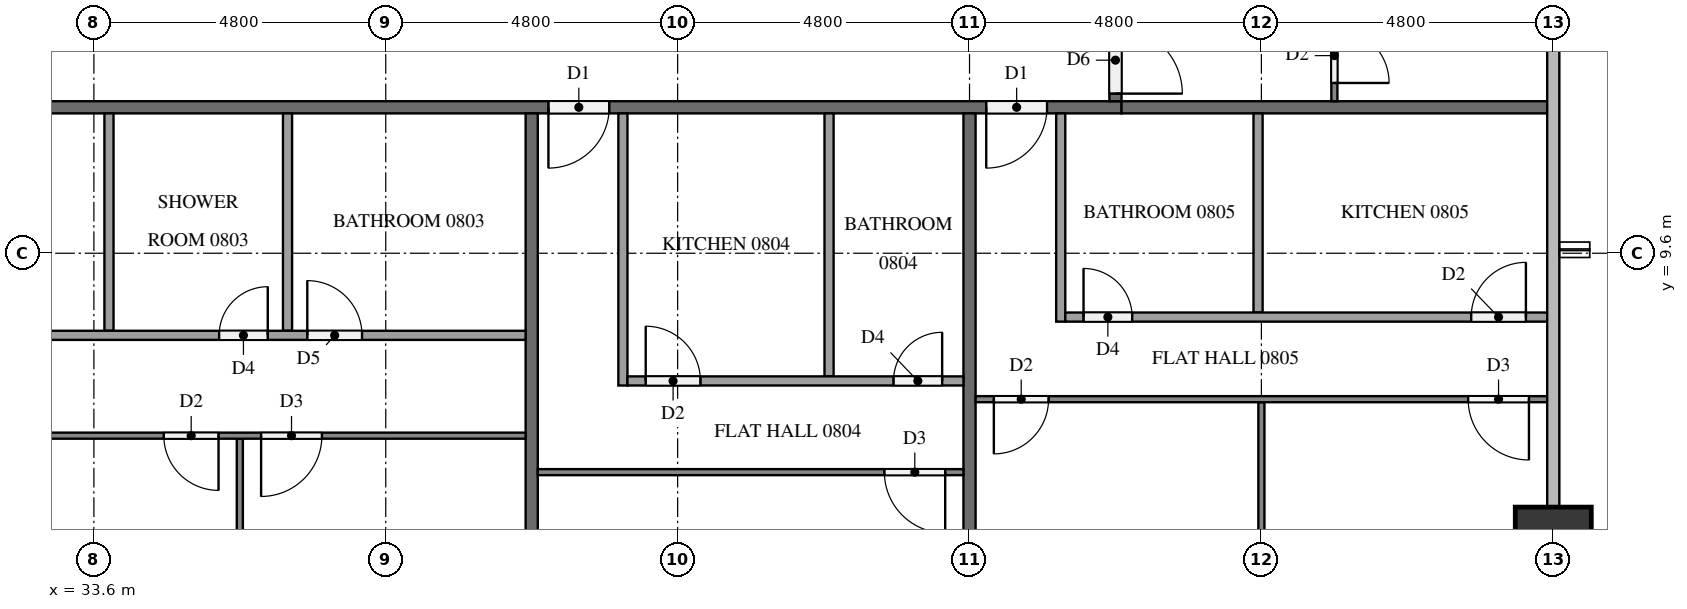
"""IFC4 building model, lengths in metres.
Left out: names, types, materials, properties, quantities, classifications, styles, units other than length and angle.
Written with IfcOpenShell. Run it as: python <this file> out.ifc"""

import sys

from ifc_helpers import new_model, si_unit, direction, frame, frame_2d, origin, origin_2d, place, context, subcontext, project, spatial, rectangle, extrude, element, fill, save


model = new_model("IFC4")
c1 = context("Model", 3, precision=1e-05, world=origin(), true_north=direction((0.0, 1.0)))
c2 = subcontext(c1, "Body", "Model", "MODEL_VIEW")
j1 = project(units=[si_unit("LENGTHUNIT", "METRE"), si_unit("PLANEANGLEUNIT", "RADIAN")], contexts=[c1])
p1 = place(None, origin())
s1 = spatial("IfcSite", under=j1, at=p1, CompositionType="ELEMENT")
p2 = place(p1, origin())
s2 = spatial("IfcBuilding", under=s1, at=p2, CompositionType="ELEMENT")
p3 = place(p2, frame((0.0, 0.0, 36.4)))
s3 = spatial("IfcBuildingStorey", under=s2, at=p3, CompositionType="ELEMENT", Elevation=36.4)
p4 = place(p3, frame((57.6, 4.8, 0.0), z_axis=(0.0, 0.0, 1.0), x_axis=(1.0, 0.0, 0.0)))
e1 = element("IfcColumn", 1, at=p4, inside=s3, PredefinedType="COLUMN", context=c2, shape_type="SweptSolid", body=[
    extrude(rectangle(XDim=1.25, YDim=1.25, at=origin_2d()), origin(), (0.0, 0.0, 1.0), 3.2),
])
p5 = place(p3, frame((50.5, 12.0, 0.0), z_axis=(0.0, 0.0, 1.0), x_axis=(-1.0, 0.0, 0.0)))
e2 = element("IfcWall", 2, at=p5, inside=s3, PredefinedType="PARTITIONING", context=c2, shape_type="SweptSolid", body=[
    extrude(rectangle(XDim=38.6, YDim=0.2, at=frame_2d((19.3, 0.0))), origin(), (0.0, 0.0, 1.0), 3.2),
])
p6 = place(p5, frame((36.375, 0.0, 0.0)))
e3 = element("IfcOpeningElement", 3, at=p6, cuts=e2, PredefinedType="OPENING", context=c2, shape_type="SweptSolid", body=[
    extrude(rectangle(XDim=1.0, YDim=2.1, at=frame_2d((0.5, 1.05))), frame((0.0, 0.11, 0.0), z_axis=(0.0, -1.0, 0.0), x_axis=(1.0, 0.0, 0.0)), (0.0, 0.0, 1.0), 0.22),
])
p7 = place(p5, frame((34.825, 0.0, 0.0)))
e4 = element("IfcOpeningElement", 4, at=p7, cuts=e2, PredefinedType="OPENING", context=c2, shape_type="SweptSolid", body=[
    extrude(rectangle(XDim=1.0, YDim=2.1, at=frame_2d((0.5, 1.05))), frame((0.0, 0.11, 0.0), z_axis=(0.0, -1.0, 0.0), x_axis=(1.0, 0.0, 0.0)), (0.0, 0.0, 1.0), 0.22),
])
p8 = place(p5, frame((22.825, 0.0, 0.0)))
e5 = element("IfcOpeningElement", 5, at=p8, cuts=e2, PredefinedType="OPENING", context=c2, shape_type="SweptSolid", body=[
    extrude(rectangle(XDim=1.0, YDim=2.1, at=frame_2d((0.5, 1.05))), frame((0.0, 0.11, 0.0), z_axis=(0.0, -1.0, 0.0), x_axis=(1.0, 0.0, 0.0)), (0.0, 0.0, 1.0), 0.22),
])
p9 = place(p5, frame((8.425, 0.0, 0.0)))
e6 = element("IfcOpeningElement", 6, at=p9, cuts=e2, PredefinedType="OPENING", context=c2, shape_type="SweptSolid", body=[
    extrude(rectangle(XDim=1.0, YDim=2.1, at=frame_2d((0.5, 1.05))), frame((0.0, 0.11, 0.0), z_axis=(0.0, -1.0, 0.0), x_axis=(1.0, 0.0, 0.0)), (0.0, 0.0, 1.0), 0.22),
])
p10 = place(p5, frame((1.225, 0.0, 0.0)))
e7 = element("IfcOpeningElement", 7, at=p10, cuts=e2, PredefinedType="OPENING", context=c2, shape_type="SweptSolid", body=[
    extrude(rectangle(XDim=1.0, YDim=2.1, at=frame_2d((0.5, 1.05))), frame((0.0, 0.11, 0.0), z_axis=(0.0, -1.0, 0.0), x_axis=(1.0, 0.0, 0.0)), (0.0, 0.0, 1.0), 0.22),
])
p11 = place(p3, frame((50.4, 40.7, 0.0), z_axis=(0.0, 0.0, 1.0), x_axis=(0.0, -1.0, 0.0)))
e8 = element("IfcWall", 8, at=p11, inside=s3, PredefinedType="PARTITIONING", context=c2, shape_type="SweptSolid", body=[
    extrude(rectangle(XDim=28.6, YDim=0.2, at=frame_2d((14.3, 0.0))), origin(), (0.0, 0.0, 1.0), 3.2),
])
p12 = place(p11, frame((27.375, 0.0, 0.0)))
e9 = element("IfcOpeningElement", 9, at=p12, cuts=e8, PredefinedType="OPENING", context=c2, shape_type="SweptSolid", body=[
    extrude(rectangle(XDim=1.1, YDim=2.1, at=frame_2d((0.55, 1.05))), frame((0.0, 0.11, 0.0), z_axis=(0.0, -1.0, 0.0), x_axis=(1.0, 0.0, 0.0)), (0.0, 0.0, 1.0), 0.22),
])
p13 = place(p11, frame((8.225, 0.0, 0.0)))
e10 = element("IfcOpeningElement", 10, at=p13, cuts=e8, PredefinedType="OPENING", context=c2, shape_type="SweptSolid", body=[
    extrude(rectangle(XDim=1.0, YDim=2.1, at=frame_2d((0.5, 1.05))), frame((0.0, 0.11, 0.0), z_axis=(0.0, -1.0, 0.0), x_axis=(1.0, 0.0, 0.0)), (0.0, 0.0, 1.0), 0.22),
])
for number, where, z_axis, x_axis in (
    (11, (40.8, 11.9, 0.0), (0.0, 0.0, 1.0), (0.0, -1.0, 0.0)),
    (12, (48.0, 11.9, 0.0), (0.0, 0.0, 1.0), (0.0, -1.0, 0.0)),
):
    element("IfcWall", number, at=place(p3, frame(where, z_axis=z_axis, x_axis=x_axis)), inside=s3, PredefinedType="PARTITIONING", context=c2, shape_type="SweptSolid", body=[
        extrude(rectangle(XDim=11.8, YDim=0.2, at=frame_2d((5.9, 0.0))), origin(), (0.0, 0.0, 1.0), 3.2),
    ])
p14 = place(p3, frame((50.5, 12.0, 0.0), z_axis=(0.0, 0.0, 1.0), x_axis=(1.0, 0.0, 0.0)))
e13 = element("IfcWall", 13, at=p14, inside=s3, PredefinedType="PARTITIONING", context=c2, shape_type="SweptSolid", body=[
    extrude(rectangle(XDim=7.0, YDim=0.2, at=frame_2d((3.5, 0.0))), origin(), (0.0, 0.0, 1.0), 3.2),
])
p15 = place(p3, frame((36.0, 6.55, 0.0), z_axis=(0.0, 0.0, 1.0), x_axis=(0.0, -1.0, 0.0)))
e14 = element("IfcWall", 14, at=p15, inside=s3, PredefinedType="PARTITIONING", context=c2, shape_type="SweptSolid", body=[
    extrude(rectangle(XDim=6.45, YDim=0.1, at=frame_2d((3.225, 0.0))), origin(), (0.0, 0.0, 1.0), 3.2),
])
p16 = place(p3, frame((40.7, 6.6, 0.0), z_axis=(0.0, 0.0, 1.0), x_axis=(-1.0, 0.0, 0.0)))
e15 = element("IfcWall", 15, at=p16, inside=s3, PredefinedType="PARTITIONING", context=c2, shape_type="SweptSolid", body=[
    extrude(rectangle(XDim=14.2, YDim=0.1, at=frame_2d((7.1, 0.0))), origin(), (0.0, 0.0, 1.0), 3.2),
])
p17 = place(p16, frame((13.0, 0.0, 0.0)))
e16 = element("IfcOpeningElement", 16, at=p17, cuts=e15, PredefinedType="OPENING", context=c2, shape_type="SweptSolid", body=[
    extrude(rectangle(XDim=0.9, YDim=2.1, at=frame_2d((0.45, 1.05))), frame((0.0, 0.06, 0.0), z_axis=(0.0, -1.0, 0.0), x_axis=(1.0, 0.0, 0.0)), (0.0, 0.0, 1.0), 0.12),
])
p18 = place(p16, frame((5.05, 0.0, 0.0)))
e17 = element("IfcOpeningElement", 17, at=p18, cuts=e15, PredefinedType="OPENING", context=c2, shape_type="SweptSolid", body=[
    extrude(rectangle(XDim=0.9, YDim=2.1, at=frame_2d((0.45, 1.05))), frame((0.0, 0.06, 0.0), z_axis=(0.0, -1.0, 0.0), x_axis=(1.0, 0.0, 0.0)), (0.0, 0.0, 1.0), 0.12),
])
p19 = place(p16, frame((3.35, 0.0, 0.0)))
e18 = element("IfcOpeningElement", 18, at=p19, cuts=e15, PredefinedType="OPENING", context=c2, shape_type="SweptSolid", body=[
    extrude(rectangle(XDim=1.0, YDim=2.1, at=frame_2d((0.5, 1.05))), frame((0.0, 0.06, 0.0), z_axis=(0.0, -1.0, 0.0), x_axis=(1.0, 0.0, 0.0)), (0.0, 0.0, 1.0), 0.12),
])
for number, where, z_axis, x_axis in (
    (19, (33.848, 11.9, 0.0), (0.0, 0.0, 1.0), (0.0, -1.0, 0.0)),
    (20, (36.785, 11.9, 0.0), (0.0, 0.0, 1.0), (0.0, -1.0, 0.0)),
):
    element("IfcWall", number, at=place(p3, frame(where, z_axis=z_axis, x_axis=x_axis)), inside=s3, PredefinedType="PARTITIONING", context=c2, shape_type="SweptSolid", body=[
        extrude(rectangle(XDim=3.575, YDim=0.15, at=frame_2d((1.788, 0.0))), origin(), (0.0, 0.0, 1.0), 3.2),
    ])
p20 = place(p3, frame((27.975, 8.25, 0.0), z_axis=(0.0, 0.0, 1.0), x_axis=(1.0, 0.0, 0.0)))
e21 = element("IfcWall", 21, at=p20, inside=s3, PredefinedType="PARTITIONING", context=c2, shape_type="SweptSolid", body=[
    extrude(rectangle(XDim=12.725, YDim=0.15, at=frame_2d((6.362, 0.0))), origin(), (0.0, 0.0, 1.0), 3.2),
])
p21 = place(p20, frame((0.3, 0.0, 0.0)))
e22 = element("IfcOpeningElement", 22, at=p21, cuts=e21, PredefinedType="OPENING", context=c2, shape_type="SweptSolid", body=[
    extrude(rectangle(XDim=0.9, YDim=2.1, at=frame_2d((0.45, 1.05))), frame((0.0, 0.085, 0.0), z_axis=(0.0, -1.0, 0.0), x_axis=(1.0, 0.0, 0.0)), (0.0, 0.0, 1.0), 0.17),
])
p22 = place(p20, frame((7.685, 0.0, 0.0)))
e23 = element("IfcOpeningElement", 23, at=p22, cuts=e21, PredefinedType="OPENING", context=c2, shape_type="SweptSolid", body=[
    extrude(rectangle(XDim=0.8, YDim=2.1, at=frame_2d((0.4, 1.05))), frame((0.0, 0.085, 0.0), z_axis=(0.0, -1.0, 0.0), x_axis=(1.0, 0.0, 0.0)), (0.0, 0.0, 1.0), 0.17),
])
p23 = place(p20, frame((9.135, 0.0, 0.0)))
e24 = element("IfcOpeningElement", 24, at=p23, cuts=e21, PredefinedType="OPENING", context=c2, shape_type="SweptSolid", body=[
    extrude(rectangle(XDim=0.9, YDim=2.1, at=frame_2d((0.45, 1.05))), frame((0.0, 0.085, 0.0), z_axis=(0.0, -1.0, 0.0), x_axis=(1.0, 0.0, 0.0)), (0.0, 0.0, 1.0), 0.17),
])
p24 = place(p3, frame((47.9, 6.0, 0.0), z_axis=(0.0, 0.0, 1.0), x_axis=(-1.0, 0.0, 0.0)))
e25 = element("IfcWall", 25, at=p24, inside=s3, PredefinedType="PARTITIONING", context=c2, shape_type="SweptSolid", body=[
    extrude(rectangle(XDim=7.0, YDim=0.1, at=frame_2d((3.5, 0.0))), origin(), (0.0, 0.0, 1.0), 3.2),
])
p25 = place(p24, frame((0.3, 0.0, 0.0)))
e26 = element("IfcOpeningElement", 26, at=p25, cuts=e25, PredefinedType="OPENING", context=c2, shape_type="SweptSolid", body=[
    extrude(rectangle(XDim=1.0, YDim=2.1, at=frame_2d((0.5, 1.05))), frame((0.0, 0.06, 0.0), z_axis=(0.0, -1.0, 0.0), x_axis=(1.0, 0.0, 0.0)), (0.0, 0.0, 1.0), 0.12),
])
p26 = place(p3, frame((45.69, 11.9, 0.0), z_axis=(0.0, 0.0, 1.0), x_axis=(0.0, -1.0, 0.0)))
e27 = element("IfcWall", 27, at=p26, inside=s3, PredefinedType="PARTITIONING", context=c2, shape_type="SweptSolid", body=[
    extrude(rectangle(XDim=4.325, YDim=0.15, at=frame_2d((2.163, 0.0))), origin(), (0.0, 0.0, 1.0), 3.2),
])
p27 = place(p3, frame((42.3, 11.9, 0.0), z_axis=(0.0, 0.0, 1.0), x_axis=(0.0, -1.0, 0.0)))
e28 = element("IfcWall", 28, at=p27, inside=s3, PredefinedType="PARTITIONING", context=c2, shape_type="SweptSolid", body=[
    extrude(rectangle(XDim=4.475, YDim=0.15, at=frame_2d((2.237, 0.0))), origin(), (0.0, 0.0, 1.0), 3.2),
])
p28 = place(p3, frame((42.375, 7.5, 0.0), z_axis=(0.0, 0.0, 1.0), x_axis=(1.0, 0.0, 0.0)))
e29 = element("IfcWall", 29, at=p28, inside=s3, PredefinedType="PARTITIONING", context=c2, shape_type="SweptSolid", body=[
    extrude(rectangle(XDim=5.525, YDim=0.15, at=frame_2d((2.762, 0.0))), origin(), (0.0, 0.0, 1.0), 3.2),
])
p29 = place(p28, frame((0.3, 0.0, 0.0)))
e30 = element("IfcOpeningElement", 30, at=p29, cuts=e29, PredefinedType="OPENING", context=c2, shape_type="SweptSolid", body=[
    extrude(rectangle(XDim=0.9, YDim=2.1, at=frame_2d((0.45, 1.05))), frame((0.0, 0.085, 0.0), z_axis=(0.0, -1.0, 0.0), x_axis=(1.0, 0.0, 0.0)), (0.0, 0.0, 1.0), 0.17),
])
p30 = place(p28, frame((4.375, 0.0, 0.0)))
e31 = element("IfcOpeningElement", 31, at=p30, cuts=e29, PredefinedType="OPENING", context=c2, shape_type="SweptSolid", body=[
    extrude(rectangle(XDim=0.8, YDim=2.1, at=frame_2d((0.4, 1.05))), frame((0.0, 0.085, 0.0), z_axis=(0.0, -1.0, 0.0), x_axis=(1.0, 0.0, 0.0)), (0.0, 0.0, 1.0), 0.17),
])
p31 = place(p3, frame((52.8, 7.15, 0.0), z_axis=(0.0, 0.0, 1.0), x_axis=(0.0, -1.0, 0.0)))
e32 = element("IfcWall", 32, at=p31, inside=s3, PredefinedType="PARTITIONING", context=c2, shape_type="SweptSolid", body=[
    extrude(rectangle(XDim=6.525, YDim=0.1, at=frame_2d((3.262, 0.0))), origin(), (0.0, 0.0, 1.0), 3.2),
])
p32 = place(p3, frame((57.5, 7.2, 0.0), z_axis=(0.0, 0.0, 1.0), x_axis=(-1.0, 0.0, 0.0)))
e33 = element("IfcWall", 33, at=p32, inside=s3, PredefinedType="PARTITIONING", context=c2, shape_type="SweptSolid", body=[
    extrude(rectangle(XDim=9.4, YDim=0.1, at=frame_2d((4.7, 0.0))), origin(), (0.0, 0.0, 1.0), 3.2),
])
p33 = place(p32, frame((8.2, 0.0, 0.0)))
e34 = element("IfcOpeningElement", 34, at=p33, cuts=e33, PredefinedType="OPENING", context=c2, shape_type="SweptSolid", body=[
    extrude(rectangle(XDim=0.9, YDim=2.1, at=frame_2d((0.45, 1.05))), frame((0.0, 0.06, 0.0), z_axis=(0.0, -1.0, 0.0), x_axis=(1.0, 0.0, 0.0)), (0.0, 0.0, 1.0), 0.12),
])
p34 = place(p32, frame((0.3, 0.0, 0.0)))
e35 = element("IfcOpeningElement", 35, at=p34, cuts=e33, PredefinedType="OPENING", context=c2, shape_type="SweptSolid", body=[
    extrude(rectangle(XDim=1.0, YDim=2.1, at=frame_2d((0.5, 1.05))), frame((0.0, 0.06, 0.0), z_axis=(0.0, -1.0, 0.0), x_axis=(1.0, 0.0, 0.0)), (0.0, 0.0, 1.0), 0.12),
])
p35 = place(p3, frame((52.745, 11.9, 0.0), z_axis=(0.0, 0.0, 1.0), x_axis=(0.0, -1.0, 0.0)))
e36 = element("IfcWall", 36, at=p35, inside=s3, PredefinedType="PARTITIONING", context=c2, shape_type="SweptSolid", body=[
    extrude(rectangle(XDim=3.275, YDim=0.15, at=frame_2d((1.637, 0.0))), origin(), (0.0, 0.0, 1.0), 3.2),
])
p36 = place(p3, frame((49.5, 11.9, 0.0), z_axis=(0.0, 0.0, 1.0), x_axis=(0.0, -1.0, 0.0)))
e37 = element("IfcWall", 37, at=p36, inside=s3, PredefinedType="PARTITIONING", context=c2, shape_type="SweptSolid", body=[
    extrude(rectangle(XDim=3.425, YDim=0.15, at=frame_2d((1.712, 0.0))), origin(), (0.0, 0.0, 1.0), 3.2),
])
p37 = place(p3, frame((49.575, 8.55, 0.0), z_axis=(0.0, 0.0, 1.0), x_axis=(1.0, 0.0, 0.0)))
e38 = element("IfcWall", 38, at=p37, inside=s3, PredefinedType="PARTITIONING", context=c2, shape_type="SweptSolid", body=[
    extrude(rectangle(XDim=7.925, YDim=0.15, at=frame_2d((3.962, 0.0))), origin(), (0.0, 0.0, 1.0), 3.2),
])
p38 = place(p37, frame((0.3, 0.0, 0.0)))
e39 = element("IfcOpeningElement", 39, at=p38, cuts=e38, PredefinedType="OPENING", context=c2, shape_type="SweptSolid", body=[
    extrude(rectangle(XDim=0.8, YDim=2.1, at=frame_2d((0.4, 1.05))), frame((0.0, 0.085, 0.0), z_axis=(0.0, -1.0, 0.0), x_axis=(1.0, 0.0, 0.0)), (0.0, 0.0, 1.0), 0.17),
])
p39 = place(p37, frame((6.675, 0.0, 0.0)))
e40 = element("IfcOpeningElement", 40, at=p39, cuts=e38, PredefinedType="OPENING", context=c2, shape_type="SweptSolid", body=[
    extrude(rectangle(XDim=0.9, YDim=2.1, at=frame_2d((0.45, 1.05))), frame((0.0, 0.085, 0.0), z_axis=(0.0, -1.0, 0.0), x_axis=(1.0, 0.0, 0.0)), (0.0, 0.0, 1.0), 0.17),
])
p40 = place(p3, frame((54.0, 31.1, 0.0), z_axis=(0.0, 0.0, 1.0), x_axis=(0.0, -1.0, 0.0)))
e41 = element("IfcWall", 41, at=p40, inside=s3, PredefinedType="PARTITIONING", context=c2, shape_type="SweptSolid", body=[
    extrude(rectangle(XDim=19.0, YDim=0.1, at=frame_2d((9.5, 0.0))), origin(), (0.0, 0.0, 1.0), 3.2),
])
p41 = place(p40, frame((17.8, 0.0, 0.0)))
e42 = element("IfcOpeningElement", 42, at=p41, cuts=e41, PredefinedType="OPENING", context=c2, shape_type="SweptSolid", body=[
    extrude(rectangle(XDim=0.9, YDim=2.1, at=frame_2d((0.45, 1.05))), frame((0.0, 0.06, 0.0), z_axis=(0.0, -1.0, 0.0), x_axis=(1.0, 0.0, 0.0)), (0.0, 0.0, 1.0), 0.12),
])
p42 = place(p40, frame((9.85, 0.0, 0.0)))
e43 = element("IfcOpeningElement", 43, at=p42, cuts=e41, PredefinedType="OPENING", context=c2, shape_type="SweptSolid", body=[
    extrude(rectangle(XDim=0.9, YDim=2.1, at=frame_2d((0.45, 1.05))), frame((0.0, 0.06, 0.0), z_axis=(0.0, -1.0, 0.0), x_axis=(1.0, 0.0, 0.0)), (0.0, 0.0, 1.0), 0.12),
])
p43 = place(p40, frame((8.15, 0.0, 0.0)))
e44 = element("IfcOpeningElement", 44, at=p43, cuts=e41, PredefinedType="OPENING", context=c2, shape_type="SweptSolid", body=[
    extrude(rectangle(XDim=1.0, YDim=2.1, at=frame_2d((0.5, 1.05))), frame((0.0, 0.06, 0.0), z_axis=(0.0, -1.0, 0.0), x_axis=(1.0, 0.0, 0.0)), (0.0, 0.0, 1.0), 0.12),
])
p44 = place(p40, frame((0.3, 0.0, 0.0)))
e45 = element("IfcOpeningElement", 45, at=p44, cuts=e41, PredefinedType="OPENING", context=c2, shape_type="SweptSolid", body=[
    extrude(rectangle(XDim=0.9, YDim=2.1, at=frame_2d((0.45, 1.05))), frame((0.0, 0.06, 0.0), z_axis=(0.0, -1.0, 0.0), x_axis=(1.0, 0.0, 0.0)), (0.0, 0.0, 1.0), 0.12),
])
p45 = place(p9, origin())
e46 = element("IfcDoor", 46, at=p45, inside=s3, OperationType="SINGLE_SWING_RIGHT", PredefinedType="DOOR", context=c2, shape_type="SweptSolid", body=[
    extrude(rectangle(XDim=1.0, YDim=2.1, at=frame_2d((0.5, 1.05))), frame((0.0, 0.025, 0.0), z_axis=(0.0, -1.0, 0.0), x_axis=(1.0, 0.0, 0.0)), (0.0, 0.0, 1.0), 0.05),
])
fill(e6, e46)
p46 = place(p10, origin())
e47 = element("IfcDoor", 47, at=p46, inside=s3, OperationType="SINGLE_SWING_RIGHT", PredefinedType="DOOR", context=c2, shape_type="SweptSolid", body=[
    extrude(rectangle(XDim=1.0, YDim=2.1, at=frame_2d((0.5, 1.05))), frame((0.0, 0.025, 0.0), z_axis=(0.0, -1.0, 0.0), x_axis=(1.0, 0.0, 0.0)), (0.0, 0.0, 1.0), 0.05),
])
fill(e7, e47)
p47 = place(p12, origin())
e48 = element("IfcDoor", 48, at=p47, inside=s3, OperationType="SINGLE_SWING_RIGHT", PredefinedType="DOOR", context=c2, shape_type="SweptSolid", body=[
    extrude(rectangle(XDim=1.1, YDim=2.1, at=frame_2d((0.55, 1.05))), frame((0.0, 0.025, 0.0), z_axis=(0.0, -1.0, 0.0), x_axis=(1.0, 0.0, 0.0)), (0.0, 0.0, 1.0), 0.05),
])
fill(e9, e48)
p48 = place(p18, origin())
e49 = element("IfcDoor", 49, at=p48, inside=s3, OperationType="SINGLE_SWING_LEFT", PredefinedType="DOOR", context=c2, shape_type="SweptSolid", body=[
    extrude(rectangle(XDim=0.9, YDim=2.1, at=frame_2d((0.45, 1.05))), frame((0.0, 0.025, 0.0), z_axis=(0.0, -1.0, 0.0), x_axis=(1.0, 0.0, 0.0)), (0.0, 0.0, 1.0), 0.05),
])
fill(e17, e49)
p49 = place(p19, origin())
e50 = element("IfcDoor", 50, at=p49, inside=s3, OperationType="SINGLE_SWING_RIGHT", PredefinedType="DOOR", context=c2, shape_type="SweptSolid", body=[
    extrude(rectangle(XDim=1.0, YDim=2.1, at=frame_2d((0.5, 1.05))), frame((0.0, 0.025, 0.0), z_axis=(0.0, -1.0, 0.0), x_axis=(1.0, 0.0, 0.0)), (0.0, 0.0, 1.0), 0.05),
])
fill(e18, e50)
p50 = place(p22, origin())
e51 = element("IfcDoor", 51, at=p50, inside=s3, OperationType="SINGLE_SWING_RIGHT", PredefinedType="DOOR", context=c2, shape_type="SweptSolid", body=[
    extrude(rectangle(XDim=0.8, YDim=2.1, at=frame_2d((0.4, 1.05))), frame((0.0, 0.025, 0.0), z_axis=(0.0, -1.0, 0.0), x_axis=(1.0, 0.0, 0.0)), (0.0, 0.0, 1.0), 0.05),
])
fill(e23, e51)
p51 = place(p23, origin())
e52 = element("IfcDoor", 52, at=p51, inside=s3, OperationType="SINGLE_SWING_LEFT", PredefinedType="DOOR", context=c2, shape_type="SweptSolid", body=[
    extrude(rectangle(XDim=0.9, YDim=2.1, at=frame_2d((0.45, 1.05))), frame((0.0, 0.025, 0.0), z_axis=(0.0, -1.0, 0.0), x_axis=(1.0, 0.0, 0.0)), (0.0, 0.0, 1.0), 0.05),
])
fill(e24, e52)
p52 = place(p25, origin())
e53 = element("IfcDoor", 53, at=p52, inside=s3, OperationType="SINGLE_SWING_LEFT", PredefinedType="DOOR", context=c2, shape_type="SweptSolid", body=[
    extrude(rectangle(XDim=1.0, YDim=2.1, at=frame_2d((0.5, 1.05))), frame((0.0, 0.025, 0.0), z_axis=(0.0, -1.0, 0.0), x_axis=(1.0, 0.0, 0.0)), (0.0, 0.0, 1.0), 0.05),
])
fill(e26, e53)
p53 = place(p29, origin())
e54 = element("IfcDoor", 54, at=p53, inside=s3, OperationType="SINGLE_SWING_LEFT", PredefinedType="DOOR", context=c2, shape_type="SweptSolid", body=[
    extrude(rectangle(XDim=0.9, YDim=2.1, at=frame_2d((0.45, 1.05))), frame((0.0, 0.025, 0.0), z_axis=(0.0, -1.0, 0.0), x_axis=(1.0, 0.0, 0.0)), (0.0, 0.0, 1.0), 0.05),
])
fill(e30, e54)
p54 = place(p30, origin())
e55 = element("IfcDoor", 55, at=p54, inside=s3, OperationType="SINGLE_SWING_RIGHT", PredefinedType="DOOR", context=c2, shape_type="SweptSolid", body=[
    extrude(rectangle(XDim=0.8, YDim=2.1, at=frame_2d((0.4, 1.05))), frame((0.0, 0.025, 0.0), z_axis=(0.0, -1.0, 0.0), x_axis=(1.0, 0.0, 0.0)), (0.0, 0.0, 1.0), 0.05),
])
fill(e31, e55)
p55 = place(p33, origin())
e56 = element("IfcDoor", 56, at=p55, inside=s3, OperationType="SINGLE_SWING_RIGHT", PredefinedType="DOOR", context=c2, shape_type="SweptSolid", body=[
    extrude(rectangle(XDim=0.9, YDim=2.1, at=frame_2d((0.45, 1.05))), frame((0.0, 0.025, 0.0), z_axis=(0.0, -1.0, 0.0), x_axis=(1.0, 0.0, 0.0)), (0.0, 0.0, 1.0), 0.05),
])
fill(e34, e56)
p56 = place(p34, origin())
e57 = element("IfcDoor", 57, at=p56, inside=s3, OperationType="SINGLE_SWING_LEFT", PredefinedType="DOOR", context=c2, shape_type="SweptSolid", body=[
    extrude(rectangle(XDim=1.0, YDim=2.1, at=frame_2d((0.5, 1.05))), frame((0.0, 0.025, 0.0), z_axis=(0.0, -1.0, 0.0), x_axis=(1.0, 0.0, 0.0)), (0.0, 0.0, 1.0), 0.05),
])
fill(e35, e57)
p57 = place(p38, origin())
e58 = element("IfcDoor", 58, at=p57, inside=s3, OperationType="SINGLE_SWING_LEFT", PredefinedType="DOOR", context=c2, shape_type="SweptSolid", body=[
    extrude(rectangle(XDim=0.8, YDim=2.1, at=frame_2d((0.4, 1.05))), frame((0.0, 0.025, 0.0), z_axis=(0.0, -1.0, 0.0), x_axis=(1.0, 0.0, 0.0)), (0.0, 0.0, 1.0), 0.05),
])
fill(e39, e58)
p58 = place(p39, origin())
e59 = element("IfcDoor", 59, at=p58, inside=s3, OperationType="SINGLE_SWING_RIGHT", PredefinedType="DOOR", context=c2, shape_type="SweptSolid", body=[
    extrude(rectangle(XDim=0.9, YDim=2.1, at=frame_2d((0.45, 1.05))), frame((0.0, 0.025, 0.0), z_axis=(0.0, -1.0, 0.0), x_axis=(1.0, 0.0, 0.0)), (0.0, 0.0, 1.0), 0.05),
])
fill(e40, e59)
p59 = place(p41, origin())
e60 = element("IfcDoor", 60, at=p59, inside=s3, OperationType="SINGLE_SWING_RIGHT", PredefinedType="DOOR", context=c2, shape_type="SweptSolid", body=[
    extrude(rectangle(XDim=0.9, YDim=2.1, at=frame_2d((0.45, 1.05))), frame((0.0, 0.025, 0.0), z_axis=(0.0, -1.0, 0.0), x_axis=(1.0, 0.0, 0.0)), (0.0, 0.0, 1.0), 0.05),
])
fill(e42, e60)
save(model, sys.argv[1])
